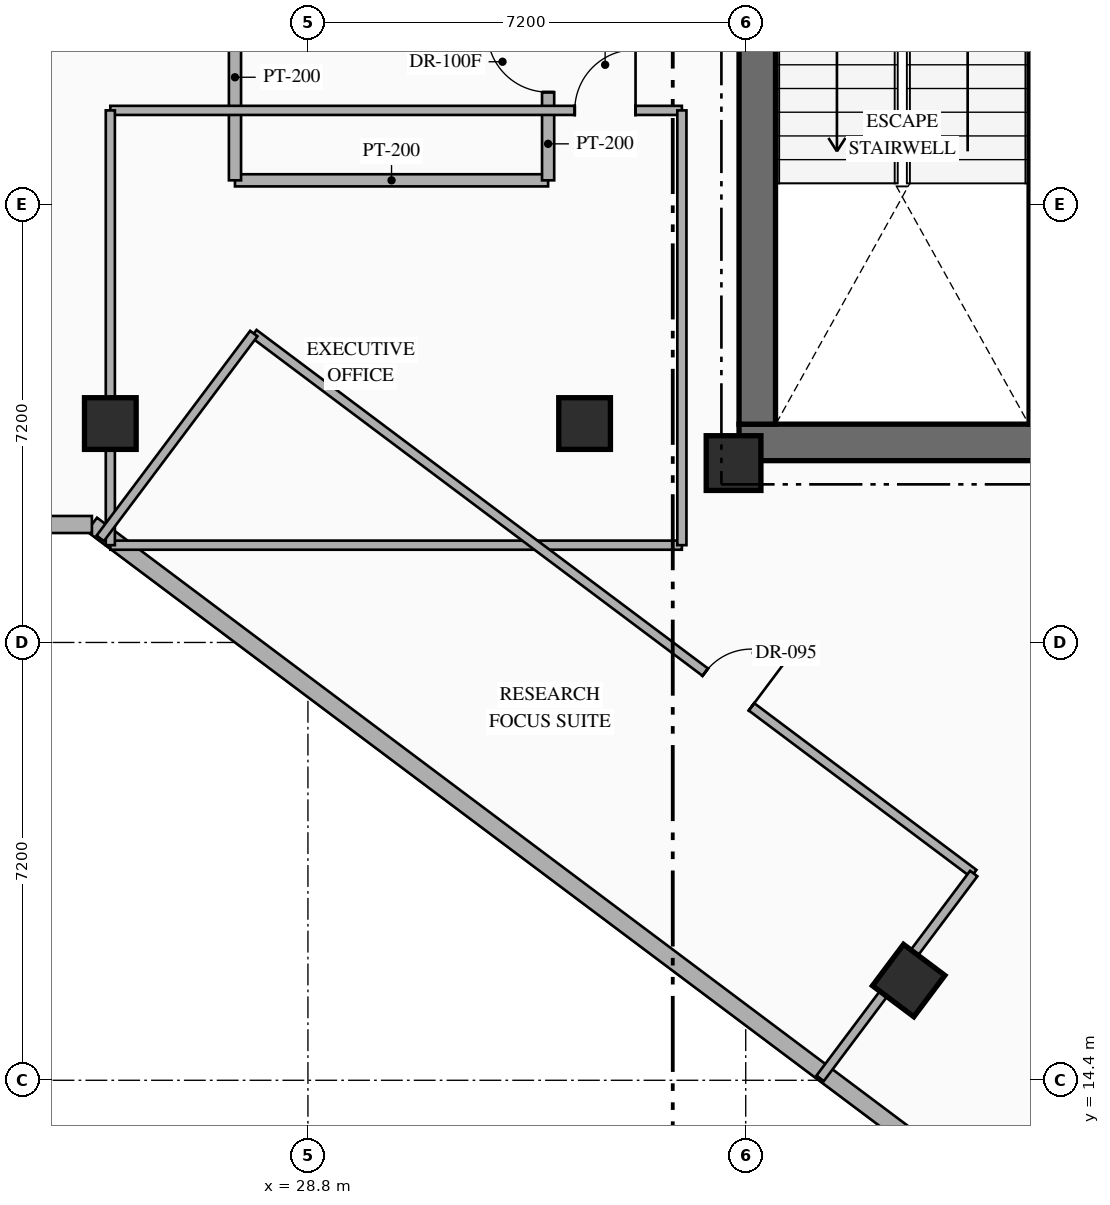
"""IFC4 building model, lengths in metres.
Left out: names, types, materials, properties, quantities, classifications, styles, units other than length and angle.
Written with IfcOpenShell. Run it as: python <this file> out.ifc"""

import sys

from ifc_helpers import new_model, si_unit, direction, frame, frame_2d, origin, origin_2d, place, context, subcontext, project, spatial, rectangle, hollow_rectangle, extrude, element, fill, save


model = new_model("IFC4")
c1 = context("Model", 3, precision=1e-05, world=origin(), true_north=direction((0.0, 1.0)))
c2 = subcontext(c1, "Body", "Model", "MODEL_VIEW")
j1 = project(units=[si_unit("LENGTHUNIT", "METRE"), si_unit("PLANEANGLEUNIT", "RADIAN")], contexts=[c1])
p1 = place(None, origin())
s1 = spatial("IfcSite", under=j1, at=p1, CompositionType="ELEMENT")
p2 = place(p1, origin())
s2 = spatial("IfcBuilding", under=s1, at=p2, CompositionType="ELEMENT")
p3 = place(p2, frame((0.0, 0.0, 152.85)))
s3 = spatial("IfcBuildingStorey", under=s2, at=p3, CompositionType="ELEMENT", Elevation=152.85)
p4 = place(p3, frame((35.89, 24.89, 0.0), z_axis=(0.0, 0.0, 1.0), x_axis=(1.0, 0.0, 0.0)))
e1 = element("IfcWall", 1, at=p4, inside=s3, PredefinedType="SHEAR", context=c2, shape_type="SweptSolid", body=[
    extrude(rectangle(XDim=7.76, YDim=0.6, at=frame_2d((3.88, 0.0))), origin(), (0.0, 0.0, 1.0), 3.6),
])
p5 = place(p3, frame((36.19, 25.19, 0.0), z_axis=(0.0, 0.0, 1.0), x_axis=(0.0, 1.0, 0.0)))
e2 = element("IfcWall", 2, at=p5, inside=s3, PredefinedType="SHEAR", context=c2, shape_type="SweptSolid", body=[
    extrude(rectangle(XDim=9.48, YDim=0.6, at=frame_2d((4.74, 0.0))), origin(), (0.0, 0.0, 1.0), 3.6),
])
p6 = place(p3, frame((40.81, 25.19, 0.0), z_axis=(0.0, 0.0, 1.0), x_axis=(0.0, 1.0, 0.0)))
e3 = element("IfcWall", 3, at=p6, inside=s3, PredefinedType="SHEAR", context=c2, shape_type="SweptSolid", body=[
    extrude(rectangle(XDim=9.48, YDim=0.3, at=frame_2d((4.74, 0.0))), origin(), (0.0, 0.0, 1.0), 3.6),
])
p7 = place(p3, frame((35.8, 24.55, 0.0), z_axis=(0.0, 0.0, 1.0), x_axis=(1.0, 0.0, 0.0)))
e4 = element("IfcColumn", 4, at=p7, inside=s3, PredefinedType="COLUMN", context=c2, shape_type="SweptSolid", body=[
    extrude(rectangle(XDim=0.9, YDim=0.9, at=origin_2d()), origin(), (0.0, 0.0, 1.0), 3.6),
])
for number, where, z_axis, x_axis in (
    (5, (25.55, 25.2, 0.0), (0.0, 0.0, 1.0), (1.0, 0.0, 0.0)),
    (6, (33.35, 25.2, 0.0), (0.0, 0.0, 1.0), (1.0, 0.0, 0.0)),
    (7, (38.68, 16.04, 0.0), (0.0, 0.0, 1.0), (0.8, -0.6, 0.0)),
):
    element("IfcColumn", number, at=place(p3, frame(where, z_axis=z_axis, x_axis=x_axis)), inside=s3, PredefinedType="COLUMN", context=c2, shape_type="SweptSolid", body=[
        extrude(hollow_rectangle(XDim=0.85, YDim=0.85, WallThickness=0.032, at=origin_2d()), origin(), (0.0, 0.0, 1.0), 3.6),
    ])
p8 = place(p3, frame((44.918, 8.787, 0.0), z_axis=(0.0, 0.0, 1.0), x_axis=(-0.800004765927, 0.599993645378, 0.0)))
e8 = element("IfcWall", 8, at=p8, inside=s3, PredefinedType="STANDARD", context=c2, shape_type="SweptSolid", body=[
    extrude(rectangle(XDim=24.588, YDim=0.28, at=frame_2d((12.294, 0.0))), origin(), (0.0, 0.0, 1.0), 3.35),
])
p9 = place(p3, frame((25.247, 23.54, 0.0), z_axis=(0.0, 0.0, 1.0), x_axis=(-1.0, 0.0, 0.0)))
e9 = element("IfcWall", 9, at=p9, inside=s3, PredefinedType="STANDARD", context=c2, shape_type="SweptSolid", body=[
    extrude(rectangle(XDim=6.747, YDim=0.28, at=frame_2d((3.374, 0.0))), origin(), (0.0, 0.0, 1.0), 3.35),
])
p10 = place(p3, frame((27.6, 29.2, 0.0), z_axis=(0.0, 0.0, 1.0), x_axis=(1.0, 0.0, 0.0)))
e10 = element("IfcWall", 10, at=p10, inside=s3, PredefinedType="STANDARD", context=c2, shape_type="SweptSolid", body=[
    extrude(rectangle(XDim=5.15, YDim=0.2, at=frame_2d((2.575, 0.0))), origin(), (0.0, 0.0, 1.0), 3.35),
])
p11 = place(p3, frame((27.6, 29.2, 0.0), z_axis=(0.0, 0.0, 1.0), x_axis=(0.0, 1.0, 0.0)))
e11 = element("IfcWall", 11, at=p11, inside=s3, PredefinedType="STANDARD", context=c2, shape_type="SweptSolid", body=[
    extrude(rectangle(XDim=3.39, YDim=0.2, at=frame_2d((1.695, 0.0))), origin(), (0.0, 0.0, 1.0), 3.35),
])
p12 = place(p3, frame((32.75, 29.2, 0.0), z_axis=(0.0, 0.0, 1.0), x_axis=(0.0, 1.0, 0.0)))
e12 = element("IfcWall", 12, at=p12, inside=s3, PredefinedType="STANDARD", context=c2, shape_type="SweptSolid", body=[
    extrude(rectangle(XDim=3.39, YDim=0.2, at=frame_2d((1.695, 0.0))), origin(), (0.0, 0.0, 1.0), 3.35),
])
p13 = place(p12, frame((1.45, 0.0, 0.0)))
e13 = element("IfcOpeningElement", 13, at=p13, cuts=e12, PredefinedType="OPENING", context=c2, shape_type="SweptSolid", body=[
    extrude(rectangle(XDim=1.0, YDim=2.2, at=frame_2d((0.5, 1.1))), frame((0.0, 0.11, 0.0), z_axis=(0.0, -1.0, 0.0), x_axis=(1.0, 0.0, 0.0)), (0.0, 0.0, 1.0), 0.22),
])
p14 = place(p3, frame((25.55, 23.2, 0.0), z_axis=(0.0, 0.0, 1.0), x_axis=(1.0, 0.0, 0.0)))
e14 = element("IfcWall", 14, at=p14, inside=s3, PredefinedType="PARTITIONING", context=c2, shape_type="SweptSolid", body=[
    extrude(rectangle(XDim=9.4, YDim=0.15, at=frame_2d((4.7, 0.0))), origin(), (0.0, 0.0, 1.0), 3.35),
])
p15 = place(p3, frame((25.55, 30.35, 0.0), z_axis=(0.0, 0.0, 1.0), x_axis=(1.0, 0.0, 0.0)))
e15 = element("IfcWall", 15, at=p15, inside=s3, PredefinedType="PARTITIONING", context=c2, shape_type="SweptSolid", body=[
    extrude(rectangle(XDim=9.4, YDim=0.15, at=frame_2d((4.7, 0.0))), origin(), (0.0, 0.0, 1.0), 3.35),
])
p16 = place(p15, frame((7.638, 0.0, 0.0)))
e16 = element("IfcOpeningElement", 16, at=p16, cuts=e15, PredefinedType="OPENING", context=c2, shape_type="SweptSolid", body=[
    extrude(rectangle(XDim=1.0, YDim=2.15, at=frame_2d((0.5, 1.075))), frame((0.0, 0.085, 0.0), z_axis=(0.0, -1.0, 0.0), x_axis=(1.0, 0.0, 0.0)), (0.0, 0.0, 1.0), 0.17),
])
p17 = place(p3, frame((25.55, 23.2, 0.0), z_axis=(0.0, 0.0, 1.0), x_axis=(0.0, 1.0, 0.0)))
e17 = element("IfcWall", 17, at=p17, inside=s3, PredefinedType="PARTITIONING", context=c2, shape_type="SweptSolid", body=[
    extrude(rectangle(XDim=7.15, YDim=0.15, at=frame_2d((3.575, 0.0))), origin(), (0.0, 0.0, 1.0), 2.695),
])
p18 = place(p3, frame((34.95, 23.2, 0.0), z_axis=(0.0, 0.0, 1.0), x_axis=(0.0, 1.0, 0.0)))
e18 = element("IfcWall", 18, at=p18, inside=s3, PredefinedType="PARTITIONING", context=c2, shape_type="SweptSolid", body=[
    extrude(rectangle(XDim=7.15, YDim=0.15, at=frame_2d((3.575, 0.0))), origin(), (0.0, 0.0, 1.0), 3.35),
])
p19 = place(p3, frame((27.91, 26.68, 0.0), z_axis=(0.0, 0.0, 1.0), x_axis=(0.800005938517, -0.599992081896, 0.0)))
e19 = element("IfcWall", 19, at=p19, inside=s3, PredefinedType="PARTITIONING", context=c2, shape_type="SweptSolid", body=[
    extrude(rectangle(XDim=14.8, YDim=0.15, at=frame_2d((7.4, 0.0))), origin(), (0.0, 0.0, 1.0), 3.35),
])
p20 = place(p19, frame((9.281, 0.0, 0.0)))
e20 = element("IfcOpeningElement", 20, at=p20, cuts=e19, PredefinedType="OPENING", context=c2, shape_type="SweptSolid", body=[
    extrude(rectangle(XDim=0.95, YDim=2.15, at=frame_2d((0.475, 1.075))), frame((0.0, 0.085, 0.0), z_axis=(0.0, -1.0, 0.0), x_axis=(1.0, 0.0, 0.0)), (0.0, 0.0, 1.0), 0.17),
])
p21 = place(p3, frame((25.384, 23.312, 0.0), z_axis=(0.0, 0.0, 1.0), x_axis=(0.599990721155, 0.80000695905, 0.0)))
e21 = element("IfcWall", 21, at=p21, inside=s3, PredefinedType="PARTITIONING", context=c2, shape_type="SweptSolid", body=[
    extrude(rectangle(XDim=4.21, YDim=0.15, at=frame_2d((2.105, 0.0))), origin(), (0.0, 0.0, 1.0), 3.35),
])
p22 = place(p3, frame((37.224, 14.432, 0.0), z_axis=(0.0, 0.0, 1.0), x_axis=(0.599962885857, 0.800027834262, 0.0)))
e22 = element("IfcWall", 22, at=p22, inside=s3, PredefinedType="PARTITIONING", context=c2, shape_type="SweptSolid", body=[
    extrude(rectangle(XDim=4.21, YDim=0.15, at=frame_2d((2.105, 0.0))), origin(), (0.0, 0.0, 1.0), 2.695),
])
p23 = place(p13, origin())
e23 = element("IfcDoor", 23, at=p23, inside=s3, OperationType="SINGLE_SWING_RIGHT", PredefinedType="DOOR", context=c2, shape_type="SweptSolid", body=[
    extrude(rectangle(XDim=1.0, YDim=2.2, at=frame_2d((0.5, 1.1))), frame((0.0, 0.025, 0.0), z_axis=(0.0, -1.0, 0.0), x_axis=(1.0, 0.0, 0.0)), (0.0, 0.0, 1.0), 0.05),
])
fill(e13, e23)
p24 = place(p16, origin())
e24 = element("IfcDoor", 24, at=p24, inside=s3, OperationType="SINGLE_SWING_RIGHT", PredefinedType="DOOR", context=c2, shape_type="SweptSolid", body=[
    extrude(rectangle(XDim=1.0, YDim=2.15, at=frame_2d((0.5, 1.075))), frame((0.0, 0.025, 0.0), z_axis=(0.0, -1.0, 0.0), x_axis=(1.0, 0.0, 0.0)), (0.0, 0.0, 1.0), 0.05),
])
fill(e16, e24)
p25 = place(p20, origin())
e25 = element("IfcDoor", 25, at=p25, inside=s3, OperationType="SINGLE_SWING_RIGHT", PredefinedType="DOOR", context=c2, shape_type="SweptSolid", body=[
    extrude(rectangle(XDim=0.95, YDim=2.15, at=frame_2d((0.475, 1.075))), frame((0.0, 0.025, 0.0), z_axis=(0.0, -1.0, 0.0), x_axis=(1.0, 0.0, 0.0)), (0.0, 0.0, 1.0), 0.05),
])
fill(e20, e25)
save(model, sys.argv[1])
